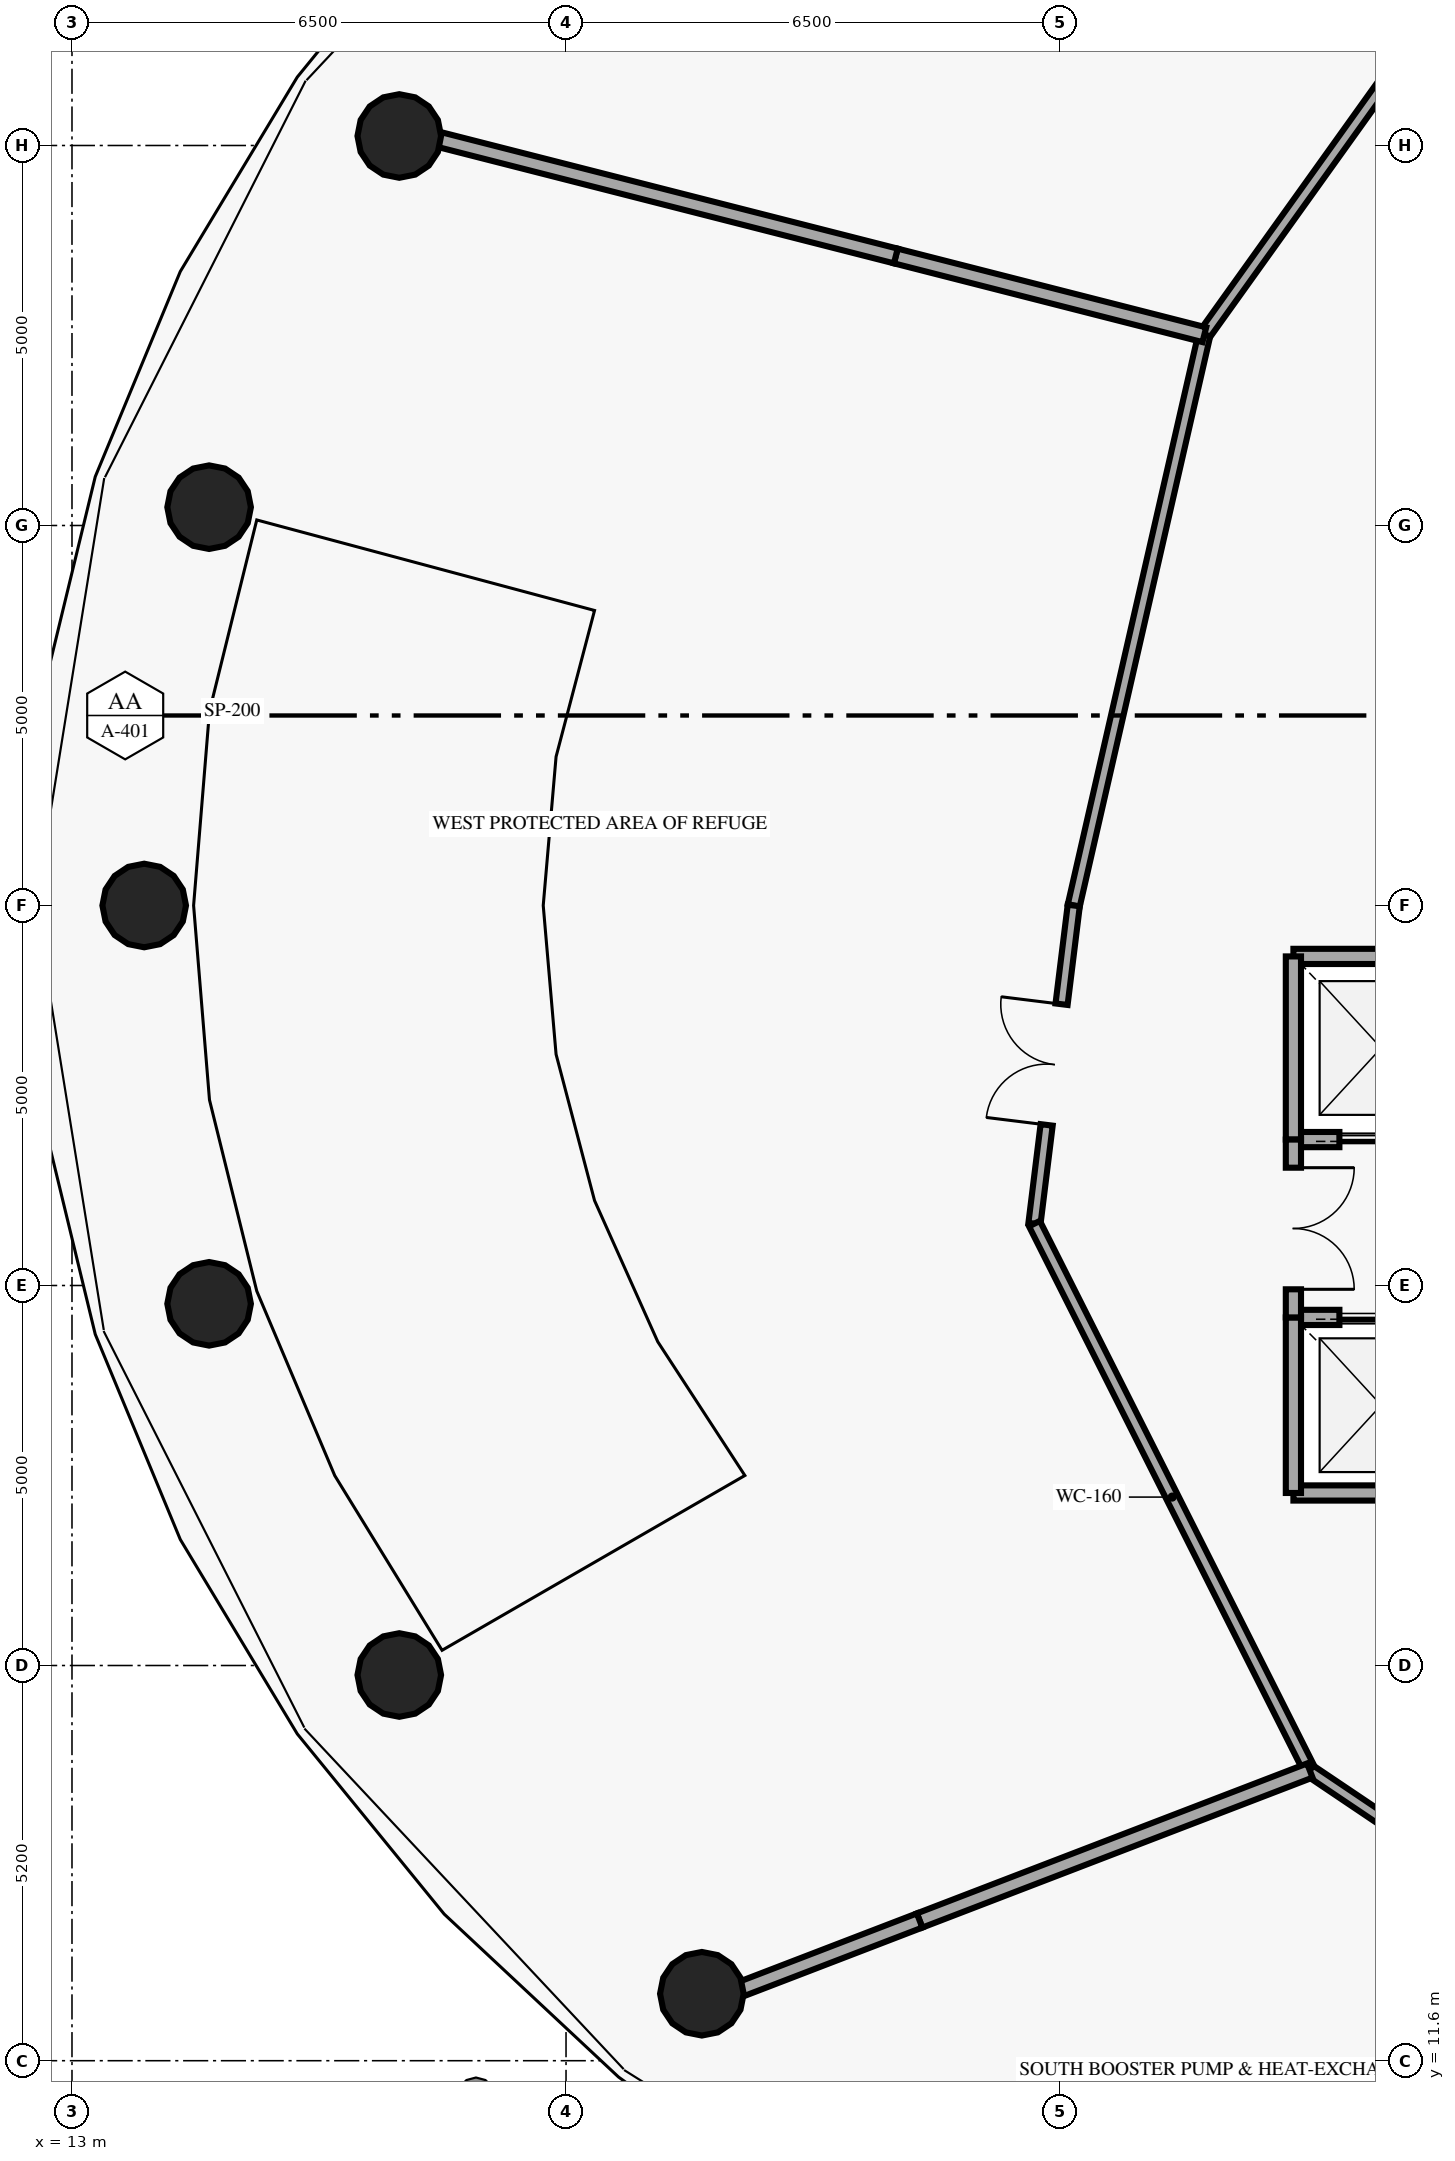
"""IFC4 building model, lengths in metres.
Left out: names, types, materials, properties, quantities, classifications, styles, units other than length and angle.
Written with IfcOpenShell. Run it as: python <this file> out.ifc"""

import sys

from ifc_helpers import new_model, si_unit, direction, frame, frame_2d, origin, origin_2d, place, context, subcontext, project, spatial, rectangle, circle, extrude, element, fill, save


model = new_model("IFC4")
c1 = context("Model", 3, precision=1e-05, world=origin(), true_north=direction((0.0, 1.0)))
c2 = subcontext(c1, "Body", "Model", "MODEL_VIEW")
j1 = project(units=[si_unit("LENGTHUNIT", "METRE"), si_unit("PLANEANGLEUNIT", "RADIAN")], contexts=[c1])
p1 = place(None, origin())
s1 = spatial("IfcSite", under=j1, at=p1, CompositionType="ELEMENT")
p2 = place(p1, origin())
s2 = spatial("IfcBuilding", under=s1, at=p2, CompositionType="ELEMENT")
p3 = place(p2, frame((0.0, 0.0, 106.05)))
s3 = spatial("IfcBuildingStorey", under=s2, at=p3, CompositionType="ELEMENT", Elevation=106.05)
for number, where, z_axis, x_axis in (
    (1, (17.306, 36.925, 0.0), (0.0, 0.0, 1.0), (1.0, 0.0, 0.0)),
    (2, (14.804, 32.041, 0.0), (0.0, 0.0, 1.0), (1.0, 0.0, 0.0)),
    (3, (13.95, 26.8, 0.0), (0.0, 0.0, 1.0), (1.0, 0.0, 0.0)),
    (4, (14.804, 21.559, 0.0), (0.0, 0.0, 1.0), (1.0, 0.0, 0.0)),
    (5, (17.306, 16.675, 0.0), (0.0, 0.0, 1.0), (1.0, 0.0, 0.0)),
    (6, (21.287, 12.481, 0.0), (0.0, 0.0, 1.0), (1.0, 0.0, 0.0)),
):
    element("IfcColumn", number, at=place(p3, frame(where, z_axis=z_axis, x_axis=x_axis)), inside=s3, PredefinedType="COLUMN", context=c2, shape_type="SweptSolid", body=[
        extrude(circle(Radius=0.55, at=origin_2d()), origin(), (0.0, 0.0, 1.0), 6.88),
    ])
p4 = place(p3, frame((29.07, 23.72, 0.0), z_axis=(0.0, 0.0, 1.0), x_axis=(1.0, 0.0, 0.0)))
e7 = element("IfcWall", 7, at=p4, inside=s3, PredefinedType="SOLIDWALL", context=c2, shape_type="SweptSolid", body=[
    extrude(rectangle(XDim=2.31, YDim=0.2, at=frame_2d((1.155, 0.0))), origin(), (0.0, 0.0, 1.0), 6.88),
])
p5 = place(p4, frame((0.605, 0.0, 0.0)))
e8 = element("IfcOpeningElement", 8, at=p5, cuts=e7, PredefinedType="OPENING", context=c2, shape_type="SweptSolid", body=[
    extrude(rectangle(XDim=1.1, YDim=2.15, at=frame_2d((0.55, 1.075))), frame((0.0, 0.11, 0.0), z_axis=(0.0, -1.0, 0.0), x_axis=(1.0, 0.0, 0.0)), (0.0, 0.0, 1.0), 0.22),
])
p6 = place(p3, frame((29.07, 26.13, 0.0), z_axis=(0.0, 0.0, 1.0), x_axis=(1.0, 0.0, 0.0)))
e9 = element("IfcWall", 9, at=p6, inside=s3, PredefinedType="SOLIDWALL", context=c2, shape_type="SweptSolid", body=[
    extrude(rectangle(XDim=2.31, YDim=0.2, at=frame_2d((1.155, 0.0))), origin(), (0.0, 0.0, 1.0), 6.88),
])
p7 = place(p3, frame((29.07, 23.72, 0.0), z_axis=(0.0, 0.0, 1.0), x_axis=(0.0, 1.0, 0.0)))
e10 = element("IfcWall", 10, at=p7, inside=s3, PredefinedType="SOLIDWALL", context=c2, shape_type="SweptSolid", body=[
    extrude(rectangle(XDim=2.41, YDim=0.2, at=frame_2d((1.205, 0.0))), origin(), (0.0, 0.0, 1.0), 6.88),
])
p8 = place(p3, frame((29.07, 19.07, 0.0), z_axis=(0.0, 0.0, 1.0), x_axis=(1.0, 0.0, 0.0)))
e11 = element("IfcWall", 11, at=p8, inside=s3, PredefinedType="SOLIDWALL", context=c2, shape_type="SweptSolid", body=[
    extrude(rectangle(XDim=2.31, YDim=0.2, at=frame_2d((1.155, 0.0))), origin(), (0.0, 0.0, 1.0), 6.88),
])
p9 = place(p3, frame((29.07, 21.38, 0.0), z_axis=(0.0, 0.0, 1.0), x_axis=(1.0, 0.0, 0.0)))
e12 = element("IfcWall", 12, at=p9, inside=s3, PredefinedType="SOLIDWALL", context=c2, shape_type="SweptSolid", body=[
    extrude(rectangle(XDim=2.31, YDim=0.2, at=frame_2d((1.155, 0.0))), origin(), (0.0, 0.0, 1.0), 6.88),
])
p10 = place(p9, frame((0.605, 0.0, 0.0)))
e13 = element("IfcOpeningElement", 13, at=p10, cuts=e12, PredefinedType="OPENING", context=c2, shape_type="SweptSolid", body=[
    extrude(rectangle(XDim=1.1, YDim=2.15, at=frame_2d((0.55, 1.075))), frame((0.0, 0.11, 0.0), z_axis=(0.0, -1.0, 0.0), x_axis=(1.0, 0.0, 0.0)), (0.0, 0.0, 1.0), 0.22),
])
p11 = place(p3, frame((29.07, 19.07, 0.0), z_axis=(0.0, 0.0, 1.0), x_axis=(0.0, 1.0, 0.0)))
e14 = element("IfcWall", 14, at=p11, inside=s3, PredefinedType="SOLIDWALL", context=c2, shape_type="SweptSolid", body=[
    extrude(rectangle(XDim=2.31, YDim=0.2, at=frame_2d((1.155, 0.0))), origin(), (0.0, 0.0, 1.0), 6.88),
])
p12 = place(p3, frame((29.07, 21.38, 0.0), z_axis=(0.0, 0.0, 1.0), x_axis=(0.0, 1.0, 0.0)))
e15 = element("IfcWall", 15, at=p12, inside=s3, PredefinedType="SOLIDWALL", context=c2, shape_type="SweptSolid", body=[
    extrude(rectangle(XDim=2.34, YDim=0.2, at=frame_2d((1.17, 0.0))), origin(), (0.0, 0.0, 1.0), 6.88),
])
p13 = place(p12, frame((0.37, 0.0, 0.0)))
e16 = element("IfcOpeningElement", 16, at=p13, cuts=e15, PredefinedType="OPENING", context=c2, shape_type="SweptSolid", body=[
    extrude(rectangle(XDim=1.6, YDim=2.2, at=frame_2d((0.8, 1.1))), frame((0.0, 0.11, 0.0), z_axis=(0.0, -1.0, 0.0), x_axis=(1.0, 0.0, 0.0)), (0.0, 0.0, 1.0), 0.22),
])
p14 = place(p3, frame((32.281, 40.436, 0.0), z_axis=(0.0, 0.0, 1.0), x_axis=(-0.581884927471, -0.813271130179, 0.0)))
e17 = element("IfcWall", 17, at=p14, inside=s3, PredefinedType="PARTITIONING", context=c2, shape_type="SweptSolid", body=[
    extrude(rectangle(XDim=7.532, YDim=0.16, at=frame_2d((3.766, 0.0))), origin(), (0.0, 0.0, 1.0), 6.88),
])
p15 = place(p3, frame((27.898, 34.31, 0.0), z_axis=(0.0, 0.0, 1.0), x_axis=(-0.223002916051, -0.974817777553, 0.0)))
e18 = element("IfcWall", 18, at=p15, inside=s3, PredefinedType="PARTITIONING", context=c2, shape_type="SweptSolid", body=[
    extrude(rectangle(XDim=7.704, YDim=0.16, at=frame_2d((3.852, 0.0))), origin(), (0.0, 0.0, 1.0), 6.88),
])
p16 = place(p3, frame((25.663, 22.614, 0.0), z_axis=(0.0, 0.0, 1.0), x_axis=(0.122538537921, 0.992463755874, 0.0)))
e19 = element("IfcWall", 19, at=p16, inside=s3, PredefinedType="PARTITIONING", context=c2, shape_type="SweptSolid", body=[
    extrude(rectangle(XDim=4.218, YDim=0.16, at=frame_2d((2.109, 0.0))), origin(), (0.0, 0.0, 1.0), 6.88),
])
p17 = place(p16, frame((1.309, 0.0, 0.0)))
e20 = element("IfcOpeningElement", 20, at=p17, cuts=e19, PredefinedType="OPENING", context=c2, shape_type="SweptSolid", body=[
    extrude(rectangle(XDim=1.6, YDim=2.2, at=frame_2d((0.8, 1.1))), frame((0.0, 0.09, 0.0), z_axis=(0.0, -1.0, 0.0), x_axis=(1.0, 0.0, 0.0)), (0.0, 0.0, 1.0), 0.18),
])
p18 = place(p3, frame((25.663, 22.614, 0.0), z_axis=(0.0, 0.0, 1.0), x_axis=(0.449672541353, -0.893193487187, 0.0)))
e21 = element("IfcWall", 21, at=p18, inside=s3, PredefinedType="PARTITIONING", context=c2, shape_type="SweptSolid", body=[
    extrude(rectangle(XDim=8.057, YDim=0.16, at=frame_2d((4.028, 0.0))), origin(), (0.0, 0.0, 1.0), 6.88),
])
p19 = place(p3, frame((29.286, 15.418, 0.0), z_axis=(0.0, 0.0, 1.0), x_axis=(0.829606474383, -0.558348544962, 0.0)))
e22 = element("IfcWall", 22, at=p19, inside=s3, PredefinedType="PARTITIONING", context=c2, shape_type="SweptSolid", body=[
    extrude(rectangle(XDim=3.716, YDim=0.16, at=frame_2d((1.858, 0.0))), origin(), (0.0, 0.0, 1.0), 6.88),
])
p20 = place(p3, frame((27.898, 34.31, 0.0), z_axis=(0.0, 0.0, 1.0), x_axis=(-0.968941187562, 0.247291275719, 0.0)))
e23 = element("IfcWall", 23, at=p20, inside=s3, PredefinedType="SOLIDWALL", context=c2, shape_type="SweptSolid", body=[
    extrude(rectangle(XDim=4.189, YDim=0.2, at=frame_2d((2.094, 0.0))), origin(), (0.0, 0.0, 1.0), 6.88),
])
p21 = place(p3, frame((23.839, 35.346, 0.0), z_axis=(0.0, 0.0, 1.0), x_axis=(-0.968974231147, 0.247161767619, 0.0)))
e24 = element("IfcWall", 24, at=p21, inside=s3, PredefinedType="SOLIDWALL", context=c2, shape_type="SweptSolid", body=[
    extrude(rectangle(XDim=7.024, YDim=0.2, at=frame_2d((3.512, 0.0))), origin(), (0.0, 0.0, 1.0), 5.23),
])
p22 = place(p3, frame((29.286, 15.418, 0.0), z_axis=(0.0, 0.0, 1.0), x_axis=(-0.933445105903, -0.358720273007, 0.0)))
e25 = element("IfcWall", 25, at=p22, inside=s3, PredefinedType="SOLIDWALL", context=c2, shape_type="SweptSolid", body=[
    extrude(rectangle(XDim=5.5, YDim=0.2, at=frame_2d((2.75, 0.0))), origin(), (0.0, 0.0, 1.0), 6.88),
])
p23 = place(p3, frame((24.152, 13.445, 0.0), z_axis=(0.0, 0.0, 1.0), x_axis=(-0.933419760617, -0.358786218367, 0.0)))
e26 = element("IfcWall", 26, at=p23, inside=s3, PredefinedType="SOLIDWALL", context=c2, shape_type="SweptSolid", body=[
    extrude(rectangle(XDim=3.308, YDim=0.2, at=frame_2d((1.654, 0.0))), origin(), (0.0, 0.0, 1.0), 5.08),
])
p24 = place(p5, origin())
e27 = element("IfcDoor", 27, at=p24, inside=s3, OperationType="DOUBLE_DOOR_SLIDING", PredefinedType="DOOR", context=c2, shape_type="SweptSolid", body=[
    extrude(rectangle(XDim=1.1, YDim=2.15, at=frame_2d((0.55, 1.075))), frame((0.0, 0.025, 0.0), z_axis=(0.0, -1.0, 0.0), x_axis=(1.0, 0.0, 0.0)), (0.0, 0.0, 1.0), 0.05),
])
fill(e8, e27)
p25 = place(p10, origin())
e28 = element("IfcDoor", 28, at=p25, inside=s3, OperationType="DOUBLE_DOOR_SLIDING", PredefinedType="DOOR", context=c2, shape_type="SweptSolid", body=[
    extrude(rectangle(XDim=1.1, YDim=2.15, at=frame_2d((0.55, 1.075))), frame((0.0, 0.025, 0.0), z_axis=(0.0, -1.0, 0.0), x_axis=(1.0, 0.0, 0.0)), (0.0, 0.0, 1.0), 0.05),
])
fill(e13, e28)
p26 = place(p13, origin())
e29 = element("IfcDoor", 29, at=p26, inside=s3, OperationType="DOUBLE_DOOR_SINGLE_SWING", PredefinedType="DOOR", context=c2, shape_type="SweptSolid", body=[
    extrude(rectangle(XDim=1.6, YDim=2.2, at=frame_2d((0.8, 1.1))), frame((0.0, 0.025, 0.0), z_axis=(0.0, -1.0, 0.0), x_axis=(1.0, 0.0, 0.0)), (0.0, 0.0, 1.0), 0.05),
])
fill(e16, e29)
p27 = place(p17, origin())
e30 = element("IfcDoor", 30, at=p27, inside=s3, OperationType="DOUBLE_DOOR_SINGLE_SWING", PredefinedType="DOOR", context=c2, shape_type="SweptSolid", body=[
    extrude(rectangle(XDim=1.6, YDim=2.2, at=frame_2d((0.8, 1.1))), frame((0.0, 0.025, 0.0), z_axis=(0.0, -1.0, 0.0), x_axis=(1.0, 0.0, 0.0)), (0.0, 0.0, 1.0), 0.05),
])
fill(e20, e30)
save(model, sys.argv[1])
